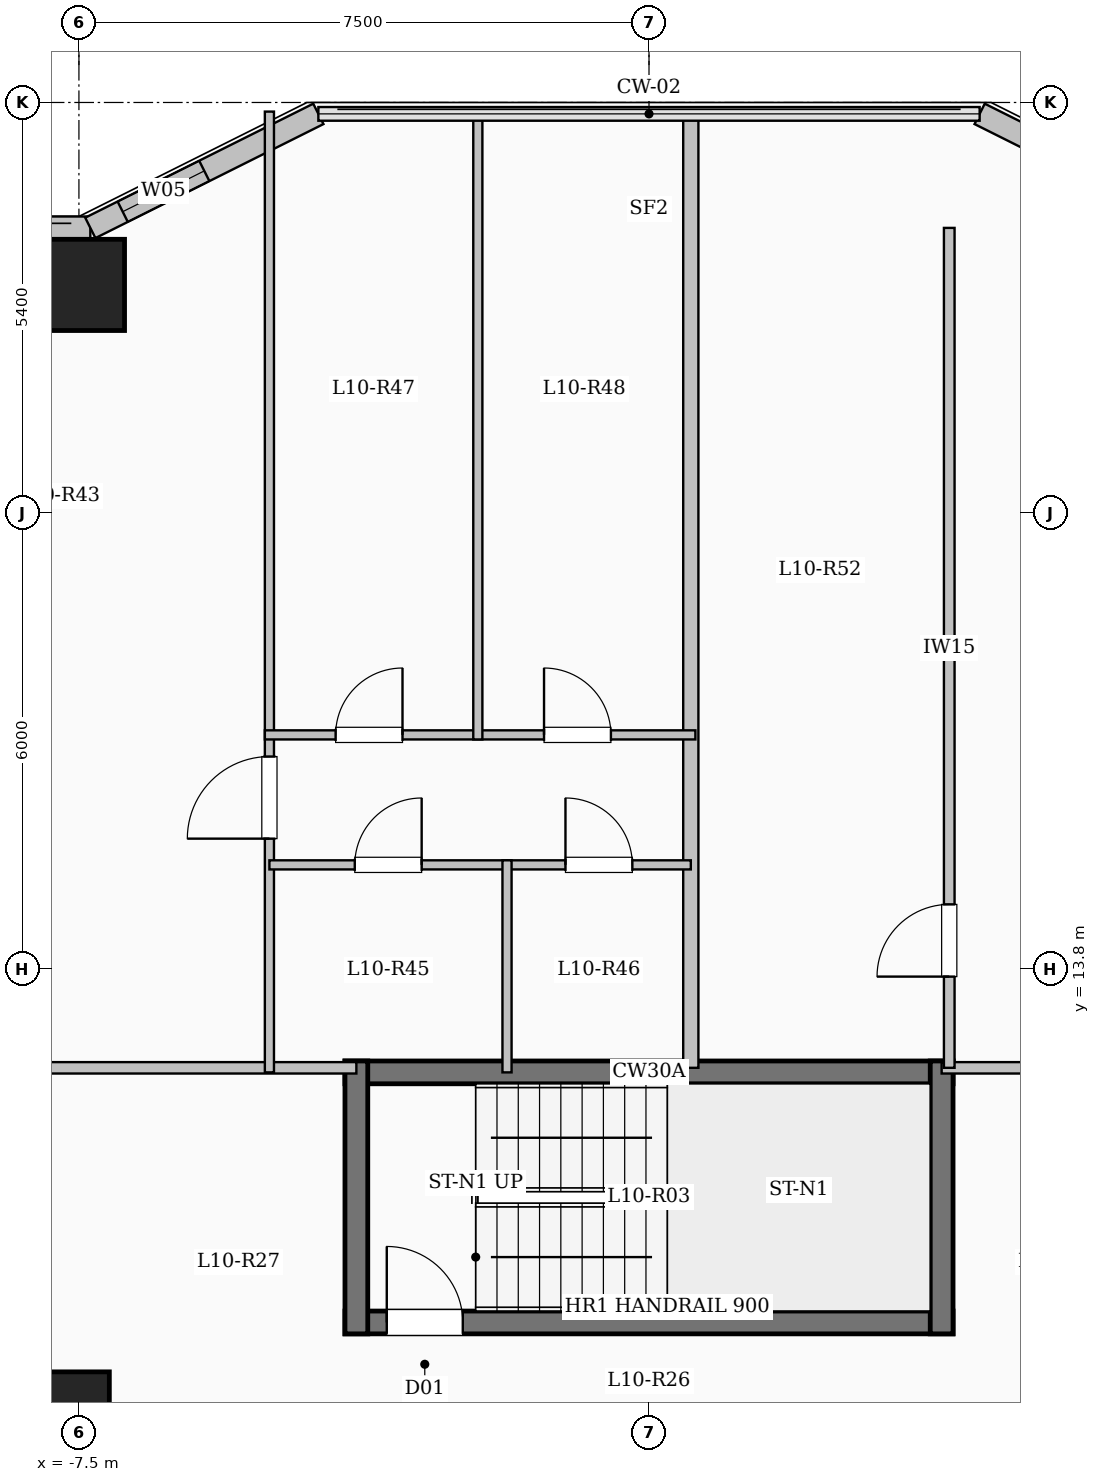
"""IFC4 building model, lengths in metres.
Left out: names, types, materials, properties, quantities, classifications, styles, units other than length and angle.
Written with IfcOpenShell. Run it as: python <this file> out.ifc"""

import sys

from ifc_helpers import new_model, si_unit, direction, frame, frame_2d, origin, origin_2d, place, context, subcontext, project, spatial, rectangle, extrude, element, fill, save


model = new_model("IFC4")
c1 = context("Model", 3, precision=1e-05, world=origin(), true_north=direction((0.0, 1.0)))
c2 = subcontext(c1, "Body", "Model", "MODEL_VIEW")
j1 = project(units=[si_unit("LENGTHUNIT", "METRE"), si_unit("PLANEANGLEUNIT", "RADIAN")], contexts=[c1])
p1 = place(None, origin())
s1 = spatial("IfcSite", under=j1, at=p1, CompositionType="ELEMENT")
p2 = place(p1, origin())
s2 = spatial("IfcBuilding", under=s1, at=p2, CompositionType="ELEMENT")
p3 = place(p2, frame((0.0, 0.0, 40.75)))
s3 = spatial("IfcBuildingStorey", under=s2, at=p3, CompositionType="ELEMENT", Elevation=40.75)
p4 = place(p3, frame((-7.8, 7.8, 0.0), z_axis=(0.0, 0.0, 1.0), x_axis=(1.0, 0.0, 0.0)))
e1 = element("IfcColumn", 1, at=p4, inside=s3, PredefinedType="COLUMN", context=c2, shape_type="SweptSolid", body=[
    extrude(rectangle(XDim=1.4, YDim=1.4, at=origin_2d()), origin(), (0.0, 0.0, 1.0), 3.35),
])
p5 = place(p3, frame((-7.5, 22.8, 0.0), z_axis=(0.0, 0.0, 1.0), x_axis=(1.0, 0.0, 0.0)))
e2 = element("IfcColumn", 2, at=p5, inside=s3, PredefinedType="COLUMN", context=c2, shape_type="SweptSolid", body=[
    extrude(rectangle(XDim=1.2, YDim=1.2, at=origin_2d()), origin(), (0.0, 0.0, 1.0), 3.35),
])
p6 = place(p3, frame((-22.65, 23.55, 0.0), z_axis=(0.0, 0.0, 1.0), x_axis=(1.0, 0.0, 0.0)))
e3 = element("IfcWall", 3, at=p6, inside=s3, PredefinedType="SOLIDWALL", context=c2, shape_type="SweptSolid", body=[
    extrude(rectangle(XDim=15.3, YDim=0.3, at=frame_2d((7.65, 0.0))), origin(), (0.0, 0.0, 1.0), 3.1),
])
p7 = place(p6, frame((1.885, 0.0, 0.9)))
e4 = element("IfcOpeningElement", 4, at=p7, cuts=e3, PredefinedType="OPENING", context=c2, shape_type="SweptSolid", body=[
    extrude(rectangle(XDim=2.4, YDim=1.8, at=frame_2d((1.2, 0.9))), frame((0.0, 0.16, 0.0), z_axis=(0.0, -1.0, 0.0), x_axis=(1.0, 0.0, 0.0)), (0.0, 0.0, 1.0), 0.32),
])
p8 = place(p6, frame((6.825, 0.0, 0.9)))
e5 = element("IfcOpeningElement", 5, at=p8, cuts=e3, PredefinedType="OPENING", context=c2, shape_type="SweptSolid", body=[
    extrude(rectangle(XDim=1.5, YDim=1.65, at=frame_2d((0.75, 0.825))), frame((0.0, 0.16, 0.0), z_axis=(0.0, -1.0, 0.0), x_axis=(1.0, 0.0, 0.0)), (0.0, 0.0, 1.0), 0.32),
])
p9 = place(p6, frame((9.835, 0.0, 0.9)))
e6 = element("IfcOpeningElement", 6, at=p9, cuts=e3, PredefinedType="OPENING", context=c2, shape_type="SweptSolid", body=[
    extrude(rectangle(XDim=1.5, YDim=1.65, at=frame_2d((0.75, 0.825))), frame((0.0, 0.16, 0.0), z_axis=(0.0, -1.0, 0.0), x_axis=(1.0, 0.0, 0.0)), (0.0, 0.0, 1.0), 0.32),
])
p10 = place(p6, frame((12.87, 0.0, 0.9)))
e7 = element("IfcOpeningElement", 7, at=p10, cuts=e3, PredefinedType="OPENING", context=c2, shape_type="SweptSolid", body=[
    extrude(rectangle(XDim=1.8, YDim=1.65, at=frame_2d((0.9, 0.825))), frame((0.0, 0.16, 0.0), z_axis=(0.0, -1.0, 0.0), x_axis=(1.0, 0.0, 0.0)), (0.0, 0.0, 1.0), 0.32),
])
p11 = place(p3, frame((-7.35, 23.55, 0.0), z_axis=(0.0, 0.0, 1.0), x_axis=(0.894427191, 0.4472135955, 0.0)))
e8 = element("IfcWall", 8, at=p11, inside=s3, PredefinedType="SOLIDWALL", context=c2, shape_type="SweptSolid", body=[
    extrude(rectangle(XDim=3.354, YDim=0.3, at=frame_2d((1.677, 0.0))), origin(), (0.0, 0.0, 1.0), 3.1),
])
p12 = place(p11, frame((0.476, 0.0, 0.95)))
e9 = element("IfcOpeningElement", 9, at=p12, cuts=e8, PredefinedType="OPENING", context=c2, shape_type="SweptSolid", body=[
    extrude(rectangle(XDim=1.2, YDim=1.5, at=frame_2d((0.6, 0.75))), frame((0.0, 0.16, 0.0), z_axis=(0.0, -1.0, 0.0), x_axis=(1.0, 0.0, 0.0)), (0.0, 0.0, 1.0), 0.32),
])
p13 = place(p3, frame((4.35, 25.05, 0.0), z_axis=(0.0, 0.0, 1.0), x_axis=(0.894427191, -0.4472135955, 0.0)))
e10 = element("IfcWall", 10, at=p13, inside=s3, PredefinedType="SOLIDWALL", context=c2, shape_type="SweptSolid", body=[
    extrude(rectangle(XDim=3.354, YDim=0.3, at=frame_2d((1.677, 0.0))), origin(), (0.0, 0.0, 1.0), 3.1),
])
p14 = place(p13, frame((1.653, 0.0, 0.95)))
e11 = element("IfcOpeningElement", 11, at=p14, cuts=e10, PredefinedType="OPENING", context=c2, shape_type="SweptSolid", body=[
    extrude(rectangle(XDim=1.2, YDim=1.5, at=frame_2d((0.6, 0.75))), frame((0.0, 0.16, 0.0), z_axis=(0.0, -1.0, 0.0), x_axis=(1.0, 0.0, 0.0)), (0.0, 0.0, 1.0), 0.32),
])
p15 = place(p3, frame((-4.0, 12.44, 0.0), z_axis=(0.0, 0.0, 1.0), x_axis=(1.0, 0.0, 0.0)))
e12 = element("IfcWall", 12, at=p15, inside=s3, PredefinedType="SHEAR", context=c2, shape_type="SweptSolid", body=[
    extrude(rectangle(XDim=8.0, YDim=0.3, at=frame_2d((4.0, 0.0))), origin(), (0.0, 0.0, 1.0), 3.35),
])
p16 = place(p3, frame((-4.0, 9.15, 0.0), z_axis=(0.0, 0.0, 1.0), x_axis=(1.0, 0.0, 0.0)))
e13 = element("IfcWall", 13, at=p16, inside=s3, PredefinedType="SHEAR", context=c2, shape_type="SweptSolid", body=[
    extrude(rectangle(XDim=8.0, YDim=0.3, at=frame_2d((4.0, 0.0))), origin(), (0.0, 0.0, 1.0), 3.35),
])
p17 = place(p16, frame((0.55, 0.0, 0.0)))
e14 = element("IfcOpeningElement", 14, at=p17, cuts=e13, PredefinedType="OPENING", context=c2, shape_type="SweptSolid", body=[
    extrude(rectangle(XDim=1.0, YDim=2.15, at=frame_2d((0.5, 1.075))), frame((0.0, 0.16, 0.0), z_axis=(0.0, -1.0, 0.0), x_axis=(1.0, 0.0, 0.0)), (0.0, 0.0, 1.0), 0.32),
])
for number, where, z_axis, x_axis in (
    (15, (-3.85, 9.0, 0.0), (0.0, 0.0, 1.0), (0.0, 1.0, 0.0)),
    (16, (3.85, 9.0, 0.0), (0.0, 0.0, 1.0), (0.0, 1.0, 0.0)),
):
    element("IfcWall", number, at=place(p3, frame(where, z_axis=z_axis, x_axis=x_axis)), inside=s3, PredefinedType="SHEAR", context=c2, shape_type="SweptSolid", body=[
        extrude(rectangle(XDim=3.59, YDim=0.3, at=frame_2d((1.795, 0.0))), origin(), (0.0, 0.0, 1.0), 3.35),
    ])
p18 = place(p3, frame((-22.55, 12.5, 0.0), z_axis=(0.0, 0.0, 1.0), x_axis=(1.0, 0.0, 0.0)))
e17 = element("IfcWall", 17, at=p18, inside=s3, PredefinedType="PARTITIONING", context=c2, shape_type="SweptSolid", body=[
    extrude(rectangle(XDim=18.7, YDim=0.15, at=frame_2d((9.35, 0.0))), origin(), (0.0, 0.0, 1.0), 3.1),
])
p19 = place(p18, frame((0.7, 0.0, 0.0)))
e18 = element("IfcOpeningElement", 18, at=p19, cuts=e17, PredefinedType="OPENING", context=c2, shape_type="SweptSolid", body=[
    extrude(rectangle(XDim=0.96, YDim=2.15, at=frame_2d((0.48, 1.075))), frame((0.0, 0.085, 0.0), z_axis=(0.0, -1.0, 0.0), x_axis=(1.0, 0.0, 0.0)), (0.0, 0.0, 1.0), 0.17),
])
p20 = place(p18, frame((13.162, 0.0, 0.0)))
e19 = element("IfcOpeningElement", 19, at=p20, cuts=e17, PredefinedType="OPENING", context=c2, shape_type="SweptSolid", body=[
    extrude(rectangle(XDim=0.96, YDim=2.15, at=frame_2d((0.48, 1.075))), frame((0.0, 0.085, 0.0), z_axis=(0.0, -1.0, 0.0), x_axis=(1.0, 0.0, 0.0)), (0.0, 0.0, 1.0), 0.17),
])
p21 = place(p3, frame((3.85, 12.5, 0.0), z_axis=(0.0, 0.0, 1.0), x_axis=(1.0, 0.0, 0.0)))
e20 = element("IfcWall", 20, at=p21, inside=s3, PredefinedType="PARTITIONING", context=c2, shape_type="SweptSolid", body=[
    extrude(rectangle(XDim=18.7, YDim=0.15, at=frame_2d((9.35, 0.0))), origin(), (0.0, 0.0, 1.0), 3.1),
])
p22 = place(p21, frame((2.942, 0.0, 0.0)))
e21 = element("IfcOpeningElement", 21, at=p22, cuts=e20, PredefinedType="OPENING", context=c2, shape_type="SweptSolid", body=[
    extrude(rectangle(XDim=0.95, YDim=2.15, at=frame_2d((0.475, 1.075))), frame((0.0, 0.085, 0.0), z_axis=(0.0, -1.0, 0.0), x_axis=(1.0, 0.0, 0.0)), (0.0, 0.0, 1.0), 0.17),
])
p23 = place(p21, frame((9.647, 0.0, 0.0)))
e22 = element("IfcOpeningElement", 22, at=p23, cuts=e20, PredefinedType="OPENING", context=c2, shape_type="SweptSolid", body=[
    extrude(rectangle(XDim=0.95, YDim=2.15, at=frame_2d((0.475, 1.075))), frame((0.0, 0.085, 0.0), z_axis=(0.0, -1.0, 0.0), x_axis=(1.0, 0.0, 0.0)), (0.0, 0.0, 1.0), 0.17),
])
p24 = place(p21, frame((15.61, 0.0, 0.0)))
e23 = element("IfcOpeningElement", 23, at=p24, cuts=e20, PredefinedType="OPENING", context=c2, shape_type="SweptSolid", body=[
    extrude(rectangle(XDim=0.95, YDim=2.15, at=frame_2d((0.475, 1.075))), frame((0.0, 0.085, 0.0), z_axis=(0.0, -1.0, 0.0), x_axis=(1.0, 0.0, 0.0)), (0.0, 0.0, 1.0), 0.17),
])
p25 = place(p3, frame((0.55, 12.5, 0.0), z_axis=(0.0, 0.0, 1.0), x_axis=(0.0, 1.0, 0.0)))
e24 = element("IfcWall", 24, at=p25, inside=s3, PredefinedType="SOLIDWALL", context=c2, shape_type="SweptSolid", body=[
    extrude(rectangle(XDim=12.58, YDim=0.2, at=frame_2d((6.29, 0.0))), origin(), (0.0, 0.0, 1.0), 3.1),
])
p26 = place(p3, frame((-4.994, 12.44, 0.0), z_axis=(0.0, 0.0, 1.0), x_axis=(0.0, 1.0, 0.0)))
e25 = element("IfcWall", 25, at=p26, inside=s3, PredefinedType="PARTITIONING", context=c2, shape_type="SweptSolid", body=[
    extrude(rectangle(XDim=12.64, YDim=0.12, at=frame_2d((6.32, 0.0))), origin(), (0.0, 0.0, 1.0), 3.1),
])
p27 = place(p26, frame((3.075, 0.0, 0.0)))
e26 = element("IfcOpeningElement", 26, at=p27, cuts=e25, PredefinedType="OPENING", context=c2, shape_type="SweptSolid", body=[
    extrude(rectangle(XDim=1.08, YDim=2.15, at=frame_2d((0.54, 1.075))), frame((0.0, 0.07, 0.0), z_axis=(0.0, -1.0, 0.0), x_axis=(1.0, 0.0, 0.0)), (0.0, 0.0, 1.0), 0.14),
])
p28 = place(p3, frame((-4.994, 15.17, 0.0), z_axis=(0.0, 0.0, 1.0), x_axis=(1.0, 0.0, 0.0)))
e27 = element("IfcWall", 27, at=p28, inside=s3, PredefinedType="PARTITIONING", context=c2, shape_type="SweptSolid", body=[
    extrude(rectangle(XDim=3.126, YDim=0.12, at=frame_2d((1.563, 0.0))), origin(), (0.0, 0.0, 1.0), 3.1),
])
p29 = place(p28, frame((1.123, 0.0, 0.0)))
e28 = element("IfcOpeningElement", 28, at=p29, cuts=e27, PredefinedType="OPENING", context=c2, shape_type="SweptSolid", body=[
    extrude(rectangle(XDim=0.88, YDim=2.1, at=frame_2d((0.44, 1.05))), frame((0.0, 0.07, 0.0), z_axis=(0.0, -1.0, 0.0), x_axis=(1.0, 0.0, 0.0)), (0.0, 0.0, 1.0), 0.14),
])
p30 = place(p3, frame((-1.868, 15.17, 0.0), z_axis=(0.0, 0.0, 1.0), x_axis=(1.0, 0.0, 0.0)))
e29 = element("IfcWall", 29, at=p30, inside=s3, PredefinedType="PARTITIONING", context=c2, shape_type="SweptSolid", body=[
    extrude(rectangle(XDim=2.418, YDim=0.12, at=frame_2d((1.209, 0.0))), origin(), (0.0, 0.0, 1.0), 3.1),
])
p31 = place(p30, frame((0.769, 0.0, 0.0)))
e30 = element("IfcOpeningElement", 30, at=p31, cuts=e29, PredefinedType="OPENING", context=c2, shape_type="SweptSolid", body=[
    extrude(rectangle(XDim=0.88, YDim=2.1, at=frame_2d((0.44, 1.05))), frame((0.0, 0.07, 0.0), z_axis=(0.0, -1.0, 0.0), x_axis=(1.0, 0.0, 0.0)), (0.0, 0.0, 1.0), 0.14),
])
p32 = place(p3, frame((-5.054, 16.88, 0.0), z_axis=(0.0, 0.0, 1.0), x_axis=(1.0, 0.0, 0.0)))
e31 = element("IfcWall", 31, at=p32, inside=s3, PredefinedType="PARTITIONING", context=c2, shape_type="SweptSolid", body=[
    extrude(rectangle(XDim=5.664, YDim=0.12, at=frame_2d((2.832, 0.0))), origin(), (0.0, 0.0, 1.0), 3.1),
])
p33 = place(p32, frame((0.931, 0.0, 0.0)))
e32 = element("IfcOpeningElement", 32, at=p33, cuts=e31, PredefinedType="OPENING", context=c2, shape_type="SweptSolid", body=[
    extrude(rectangle(XDim=0.88, YDim=2.1, at=frame_2d((0.44, 1.05))), frame((0.0, 0.07, 0.0), z_axis=(0.0, -1.0, 0.0), x_axis=(1.0, 0.0, 0.0)), (0.0, 0.0, 1.0), 0.14),
])
p34 = place(p32, frame((3.673, 0.0, 0.0)))
e33 = element("IfcOpeningElement", 33, at=p34, cuts=e31, PredefinedType="OPENING", context=c2, shape_type="SweptSolid", body=[
    extrude(rectangle(XDim=0.88, YDim=2.1, at=frame_2d((0.44, 1.05))), frame((0.0, 0.07, 0.0), z_axis=(0.0, -1.0, 0.0), x_axis=(1.0, 0.0, 0.0)), (0.0, 0.0, 1.0), 0.14),
])
p35 = place(p3, frame((-1.868, 12.44, 0.0), z_axis=(0.0, 0.0, 1.0), x_axis=(0.0, 1.0, 0.0)))
e34 = element("IfcWall", 34, at=p35, inside=s3, PredefinedType="PARTITIONING", context=c2, shape_type="SweptSolid", body=[
    extrude(rectangle(XDim=2.79, YDim=0.12, at=frame_2d((1.395, 0.0))), origin(), (0.0, 0.0, 1.0), 3.1),
])
p36 = place(p3, frame((-2.252, 16.82, 0.0), z_axis=(0.0, 0.0, 1.0), x_axis=(0.0, 1.0, 0.0)))
e35 = element("IfcWall", 35, at=p36, inside=s3, PredefinedType="PARTITIONING", context=c2, shape_type="SweptSolid", body=[
    extrude(rectangle(XDim=8.26, YDim=0.12, at=frame_2d((4.13, 0.0))), origin(), (0.0, 0.0, 1.0), 3.1),
])
p37 = place(p3, frame((3.95, 12.5, 0.0), z_axis=(0.0, 0.0, 1.0), x_axis=(0.0, 1.0, 0.0)))
e36 = element("IfcWall", 36, at=p37, inside=s3, PredefinedType="PARTITIONING", context=c2, shape_type="SweptSolid", body=[
    extrude(rectangle(XDim=11.05, YDim=0.14, at=frame_2d((5.525, 0.0))), origin(), (0.0, 0.0, 1.0), 3.1),
])
p38 = place(p37, frame((1.2, 0.0, 0.0)))
e37 = element("IfcOpeningElement", 37, at=p38, cuts=e36, PredefinedType="OPENING", context=c2, shape_type="SweptSolid", body=[
    extrude(rectangle(XDim=0.95, YDim=2.15, at=frame_2d((0.475, 1.075))), frame((0.0, 0.08, 0.0), z_axis=(0.0, -1.0, 0.0), x_axis=(1.0, 0.0, 0.0)), (0.0, 0.0, 1.0), 0.16),
])
p39 = place(p12, origin())
e38 = element("IfcWindow", 38, at=p39, inside=s3, PartitioningType="SINGLE_PANEL", PredefinedType="WINDOW", context=c2, shape_type="SweptSolid", body=[
    extrude(rectangle(XDim=1.2, YDim=1.5, at=frame_2d((0.6, 0.75))), frame((0.0, 0.03, 0.0), z_axis=(0.0, -1.0, 0.0), x_axis=(1.0, 0.0, 0.0)), (0.0, 0.0, 1.0), 0.06),
])
fill(e9, e38)
p40 = place(p17, origin())
e39 = element("IfcDoor", 39, at=p40, inside=s3, OperationType="SINGLE_SWING_LEFT", PredefinedType="DOOR", context=c2, shape_type="SweptSolid", body=[
    extrude(rectangle(XDim=1.0, YDim=2.15, at=frame_2d((0.5, 1.075))), frame((0.0, 0.025, 0.0), z_axis=(0.0, -1.0, 0.0), x_axis=(1.0, 0.0, 0.0)), (0.0, 0.0, 1.0), 0.05),
])
fill(e14, e39)
p41 = place(p27, origin())
e40 = element("IfcDoor", 40, at=p41, inside=s3, OperationType="SINGLE_SWING_LEFT", PredefinedType="DOOR", context=c2, shape_type="SweptSolid", body=[
    extrude(rectangle(XDim=1.08, YDim=2.15, at=frame_2d((0.54, 1.075))), frame((0.0, 0.025, 0.0), z_axis=(0.0, -1.0, 0.0), x_axis=(1.0, 0.0, 0.0)), (0.0, 0.0, 1.0), 0.05),
])
fill(e26, e40)
p42 = place(p29, origin())
e41 = element("IfcDoor", 41, at=p42, inside=s3, OperationType="SINGLE_SWING_RIGHT", PredefinedType="DOOR", context=c2, shape_type="SweptSolid", body=[
    extrude(rectangle(XDim=0.88, YDim=2.1, at=frame_2d((0.44, 1.05))), frame((0.0, 0.025, 0.0), z_axis=(0.0, -1.0, 0.0), x_axis=(1.0, 0.0, 0.0)), (0.0, 0.0, 1.0), 0.05),
])
fill(e28, e41)
p43 = place(p31, origin())
e42 = element("IfcDoor", 42, at=p43, inside=s3, OperationType="SINGLE_SWING_LEFT", PredefinedType="DOOR", context=c2, shape_type="SweptSolid", body=[
    extrude(rectangle(XDim=0.88, YDim=2.1, at=frame_2d((0.44, 1.05))), frame((0.0, 0.025, 0.0), z_axis=(0.0, -1.0, 0.0), x_axis=(1.0, 0.0, 0.0)), (0.0, 0.0, 1.0), 0.05),
])
fill(e30, e42)
p44 = place(p33, origin())
e43 = element("IfcDoor", 43, at=p44, inside=s3, OperationType="SINGLE_SWING_RIGHT", PredefinedType="DOOR", context=c2, shape_type="SweptSolid", body=[
    extrude(rectangle(XDim=0.88, YDim=2.1, at=frame_2d((0.44, 1.05))), frame((0.0, 0.025, 0.0), z_axis=(0.0, -1.0, 0.0), x_axis=(1.0, 0.0, 0.0)), (0.0, 0.0, 1.0), 0.05),
])
fill(e32, e43)
p45 = place(p34, origin())
e44 = element("IfcDoor", 44, at=p45, inside=s3, OperationType="SINGLE_SWING_LEFT", PredefinedType="DOOR", context=c2, shape_type="SweptSolid", body=[
    extrude(rectangle(XDim=0.88, YDim=2.1, at=frame_2d((0.44, 1.05))), frame((0.0, 0.025, 0.0), z_axis=(0.0, -1.0, 0.0), x_axis=(1.0, 0.0, 0.0)), (0.0, 0.0, 1.0), 0.05),
])
fill(e33, e44)
p46 = place(p38, origin())
e45 = element("IfcDoor", 45, at=p46, inside=s3, OperationType="SINGLE_SWING_LEFT", PredefinedType="DOOR", context=c2, shape_type="SweptSolid", body=[
    extrude(rectangle(XDim=0.95, YDim=2.15, at=frame_2d((0.475, 1.075))), frame((0.0, 0.025, 0.0), z_axis=(0.0, -1.0, 0.0), x_axis=(1.0, 0.0, 0.0)), (0.0, 0.0, 1.0), 0.05),
])
fill(e37, e45)
save(model, sys.argv[1])
